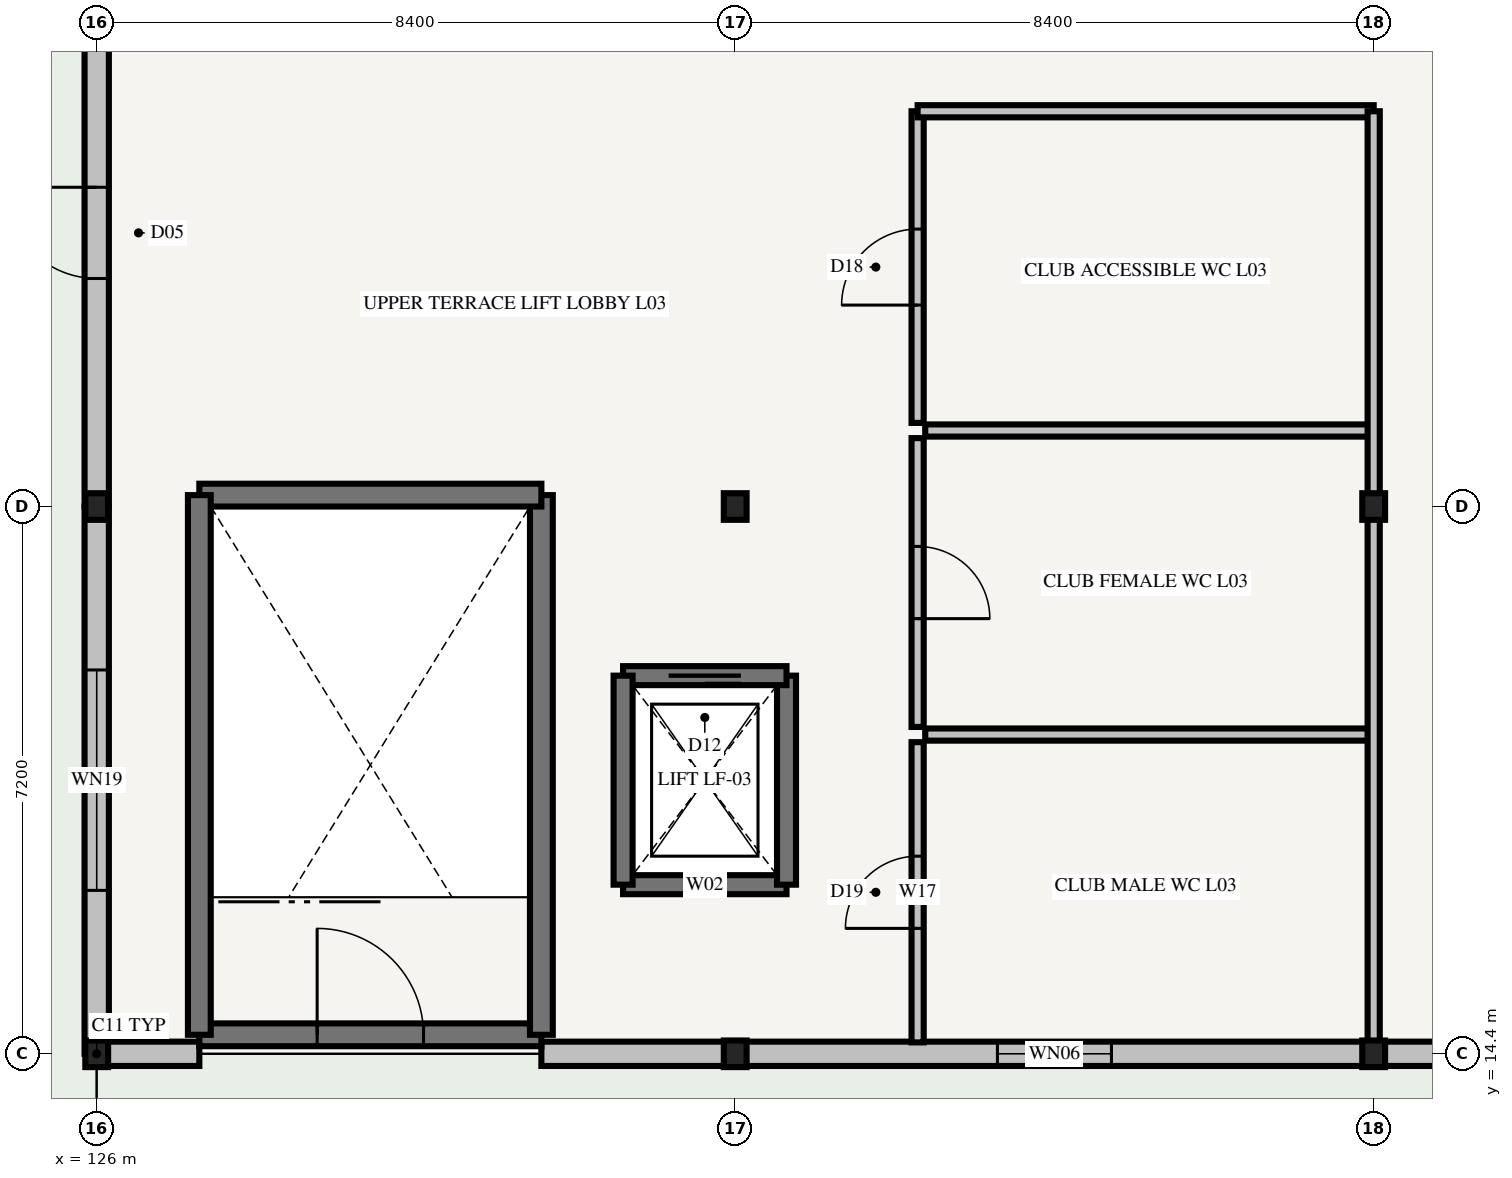
"""IFC4 building model, lengths in metres.
Left out: names, types, materials, properties, quantities, classifications, styles, units other than length and angle.
Written with IfcOpenShell. Run it as: python <this file> out.ifc"""

import sys

from ifc_helpers import new_model, si_unit, direction, frame, frame_2d, origin, origin_2d, place, context, subcontext, project, spatial, rectangle, i_section, extrude, element, fill, save


model = new_model("IFC4")
c1 = context("Model", 3, precision=1e-05, world=origin(), true_north=direction((0.0, 1.0)))
c2 = subcontext(c1, "Body", "Model", "MODEL_VIEW")
j1 = project(units=[si_unit("LENGTHUNIT", "METRE"), si_unit("PLANEANGLEUNIT", "RADIAN")], contexts=[c1])
p1 = place(None, origin())
s1 = spatial("IfcSite", under=j1, at=p1, CompositionType="ELEMENT")
p2 = place(p1, origin())
s2 = spatial("IfcBuilding", under=s1, at=p2, CompositionType="ELEMENT")
p3 = place(p2, frame((0.0, 0.0, 12.9)))
s3 = spatial("IfcBuildingStorey", under=s2, at=p3, CompositionType="ELEMENT", Elevation=12.9)
for number, where, z_axis, x_axis in (
    (1, (126.0, 14.4, 0.0), (0.0, 0.0, 1.0), (1.0, 0.0, 0.0)),
    (2, (126.0, 21.6, 0.0), (0.0, 0.0, 1.0), (1.0, 0.0, 0.0)),
    (3, (134.4, 14.4, 0.0), (0.0, 0.0, 1.0), (1.0, 0.0, 0.0)),
    (4, (134.4, 21.6, 0.0), (0.0, 0.0, 1.0), (1.0, 0.0, 0.0)),
    (5, (142.8, 14.4, 0.0), (0.0, 0.0, 1.0), (1.0, 0.0, 0.0)),
    (6, (142.8, 21.6, 0.0), (0.0, 0.0, 1.0), (1.0, 0.0, 0.0)),
):
    element("IfcColumn", number, at=place(p3, frame(where, z_axis=z_axis, x_axis=x_axis)), inside=s3, PredefinedType="COLUMN", context=c2, shape_type="SweptSolid", body=[
        extrude(i_section(OverallWidth=0.3, OverallDepth=0.35, WebThickness=0.01, FlangeThickness=0.018, FilletRadius=0.027, at=origin_2d()), origin(), (0.0, 0.0, 1.0), 4.2),
    ])
p4 = place(p3, frame((126.0, 28.8, 0.0), z_axis=(0.0, 0.0, 1.0), x_axis=(0.0, -1.0, 0.0)))
e7 = element("IfcWall", 7, at=p4, inside=s3, PredefinedType="STANDARD", context=c2, shape_type="SweptSolid", body=[
    extrude(rectangle(XDim=7.2, YDim=0.32, at=frame_2d((3.6, 0.0))), origin(), (0.0, 0.0, 1.0), 3.345),
])
p5 = place(p4, frame((3.0, 0.0, 0.0)))
e8 = element("IfcOpeningElement", 8, at=p5, cuts=e7, PredefinedType="OPENING", context=c2, shape_type="SweptSolid", body=[
    extrude(rectangle(XDim=1.2, YDim=2.25, at=frame_2d((0.6, 1.125))), frame((0.0, 0.185, 0.0), z_axis=(0.0, -1.0, 0.0), x_axis=(1.0, 0.0, 0.0)), (0.0, 0.0, 1.0), 0.37),
])
p6 = place(p3, frame((126.0, 21.6, 0.0), z_axis=(0.0, 0.0, 1.0), x_axis=(0.0, -1.0, 0.0)))
e9 = element("IfcWall", 9, at=p6, inside=s3, PredefinedType="STANDARD", context=c2, shape_type="SweptSolid", body=[
    extrude(rectangle(XDim=7.2, YDim=0.32, at=frame_2d((3.6, 0.0))), origin(), (0.0, 0.0, 1.0), 3.445),
])
p7 = place(p6, frame((2.15, 0.0, 0.85)))
e10 = element("IfcOpeningElement", 10, at=p7, cuts=e9, PredefinedType="OPENING", context=c2, shape_type="SweptSolid", body=[
    extrude(rectangle(XDim=2.9, YDim=1.9, at=frame_2d((1.45, 0.95))), frame((0.0, 0.185, 0.0), z_axis=(0.0, -1.0, 0.0), x_axis=(1.0, 0.0, 0.0)), (0.0, 0.0, 1.0), 0.37),
])
p8 = place(p3, frame((126.0, 14.4, 0.0), z_axis=(0.0, 0.0, 1.0), x_axis=(1.0, 0.0, 0.0)))
e11 = element("IfcWall", 11, at=p8, inside=s3, PredefinedType="STANDARD", context=c2, shape_type="SweptSolid", body=[
    extrude(rectangle(XDim=1.35, YDim=0.32, at=frame_2d((0.675, 0.0))), origin(), (0.0, 0.0, 1.0), 3.445),
])
p9 = place(p3, frame((131.85, 14.4, 0.0), z_axis=(0.0, 0.0, 1.0), x_axis=(1.0, 0.0, 0.0)))
e12 = element("IfcWall", 12, at=p9, inside=s3, PredefinedType="STANDARD", context=c2, shape_type="SweptSolid", body=[
    extrude(rectangle(XDim=2.55, YDim=0.32, at=frame_2d((1.275, 0.0))), origin(), (0.0, 0.0, 1.0), 3.495),
])
p10 = place(p3, frame((134.4, 14.4, 0.0), z_axis=(0.0, 0.0, 1.0), x_axis=(1.0, 0.0, 0.0)))
e13 = element("IfcWall", 13, at=p10, inside=s3, PredefinedType="STANDARD", context=c2, shape_type="SweptSolid", body=[
    extrude(rectangle(XDim=8.4, YDim=0.32, at=frame_2d((4.2, 0.0))), origin(), (0.0, 0.0, 1.0), 3.495),
])
p11 = place(p10, frame((3.45, 0.0, 0.85)))
e14 = element("IfcOpeningElement", 14, at=p11, cuts=e13, PredefinedType="OPENING", context=c2, shape_type="SweptSolid", body=[
    extrude(rectangle(XDim=1.5, YDim=1.8, at=frame_2d((0.75, 0.9))), frame((0.0, 0.185, 0.0), z_axis=(0.0, -1.0, 0.0), x_axis=(1.0, 0.0, 0.0)), (0.0, 0.0, 1.0), 0.37),
])
p12 = place(p3, frame((142.8, 14.4, 0.0), z_axis=(0.0, 0.0, 1.0), x_axis=(1.0, 0.0, 0.0)))
e15 = element("IfcWall", 15, at=p12, inside=s3, PredefinedType="STANDARD", context=c2, shape_type="SweptSolid", body=[
    extrude(rectangle(XDim=8.4, YDim=0.32, at=frame_2d((4.2, 0.0))), origin(), (0.0, 0.0, 1.0), 3.445),
])
p13 = place(p12, frame((3.36, 0.0, 0.0)))
e16 = element("IfcOpeningElement", 16, at=p13, cuts=e15, PredefinedType="OPENING", context=c2, shape_type="SweptSolid", body=[
    extrude(rectangle(XDim=1.68, YDim=2.3, at=frame_2d((0.84, 1.15))), frame((0.0, 0.185, 0.0), z_axis=(0.0, -1.0, 0.0), x_axis=(1.0, 0.0, 0.0)), (0.0, 0.0, 1.0), 0.37),
])
p14 = place(p3, frame((127.35, 14.65, 0.0), z_axis=(0.0, 0.0, 1.0), x_axis=(1.0, 0.0, 0.0)))
e17 = element("IfcWall", 17, at=p14, inside=s3, PredefinedType="SHEAR", context=c2, shape_type="SweptSolid", body=[
    extrude(rectangle(XDim=4.5, YDim=0.3, at=frame_2d((2.25, 0.0))), origin(), (0.0, 0.0, 1.0), 4.56),
])
p15 = place(p14, frame((1.55, 0.0, 0.0)))
e18 = element("IfcOpeningElement", 18, at=p15, cuts=e17, PredefinedType="OPENING", context=c2, shape_type="SweptSolid", body=[
    extrude(rectangle(XDim=1.4, YDim=2.2, at=frame_2d((0.7, 1.1))), frame((0.0, 0.175, 0.0), z_axis=(0.0, -1.0, 0.0), x_axis=(1.0, 0.0, 0.0)), (0.0, 0.0, 1.0), 0.35),
])
p16 = place(p3, frame((131.85, 14.65, 0.0), z_axis=(0.0, 0.0, 1.0), x_axis=(0.0, 1.0, 0.0)))
e19 = element("IfcWall", 19, at=p16, inside=s3, PredefinedType="SHEAR", context=c2, shape_type="SweptSolid", body=[
    extrude(rectangle(XDim=7.1, YDim=0.3, at=frame_2d((3.55, 0.0))), origin(), (0.0, 0.0, 1.0), 4.56),
])
p17 = place(p3, frame((131.85, 21.75, 0.0), z_axis=(0.0, 0.0, 1.0), x_axis=(-1.0, 0.0, 0.0)))
e20 = element("IfcWall", 20, at=p17, inside=s3, PredefinedType="SHEAR", context=c2, shape_type="SweptSolid", body=[
    extrude(rectangle(XDim=4.5, YDim=0.3, at=frame_2d((2.25, 0.0))), origin(), (0.0, 0.0, 1.0), 4.56),
])
p18 = place(p3, frame((127.35, 21.75, 0.0), z_axis=(0.0, 0.0, 1.0), x_axis=(0.0, -1.0, 0.0)))
e21 = element("IfcWall", 21, at=p18, inside=s3, PredefinedType="SHEAR", context=c2, shape_type="SweptSolid", body=[
    extrude(rectangle(XDim=7.1, YDim=0.3, at=frame_2d((3.55, 0.0))), origin(), (0.0, 0.0, 1.0), 4.56),
])
p19 = place(p3, frame((132.925, 16.625, 0.0), z_axis=(0.0, 0.0, 1.0), x_axis=(1.0, 0.0, 0.0)))
e22 = element("IfcWall", 22, at=p19, inside=s3, PredefinedType="SHEAR", context=c2, shape_type="SweptSolid", body=[
    extrude(rectangle(XDim=2.15, YDim=0.25, at=frame_2d((1.075, 0.0))), origin(), (0.0, 0.0, 1.0), 5.1),
])
p20 = place(p3, frame((135.075, 16.625, 0.0), z_axis=(0.0, 0.0, 1.0), x_axis=(0.0, 1.0, 0.0)))
e23 = element("IfcWall", 23, at=p20, inside=s3, PredefinedType="SHEAR", context=c2, shape_type="SweptSolid", body=[
    extrude(rectangle(XDim=2.75, YDim=0.25, at=frame_2d((1.375, 0.0))), origin(), (0.0, 0.0, 1.0), 5.1),
])
p21 = place(p3, frame((135.075, 19.375, 0.0), z_axis=(0.0, 0.0, 1.0), x_axis=(-1.0, 0.0, 0.0)))
e24 = element("IfcWall", 24, at=p21, inside=s3, PredefinedType="SHEAR", context=c2, shape_type="SweptSolid", body=[
    extrude(rectangle(XDim=2.15, YDim=0.25, at=frame_2d((1.075, 0.0))), origin(), (0.0, 0.0, 1.0), 5.1),
])
p22 = place(p21, frame((0.6, 0.0, 0.0)))
e25 = element("IfcOpeningElement", 25, at=p22, cuts=e24, PredefinedType="OPENING", context=c2, shape_type="SweptSolid", body=[
    extrude(rectangle(XDim=0.95, YDim=2.1, at=frame_2d((0.475, 1.05))), frame((0.0, 0.15, 0.0), z_axis=(0.0, -1.0, 0.0), x_axis=(1.0, 0.0, 0.0)), (0.0, 0.0, 1.0), 0.3),
])
p23 = place(p3, frame((132.925, 19.375, 0.0), z_axis=(0.0, 0.0, 1.0), x_axis=(0.0, -1.0, 0.0)))
e26 = element("IfcWall", 26, at=p23, inside=s3, PredefinedType="SHEAR", context=c2, shape_type="SweptSolid", body=[
    extrude(rectangle(XDim=2.75, YDim=0.25, at=frame_2d((1.375, 0.0))), origin(), (0.0, 0.0, 1.0), 5.1),
])
p24 = place(p3, frame((136.8, 14.55, 0.0), z_axis=(0.0, 0.0, 1.0), x_axis=(0.0, 1.0, 0.0)))
e27 = element("IfcWall", 27, at=p24, inside=s3, PredefinedType="PARTITIONING", context=c2, shape_type="SweptSolid", body=[
    extrude(rectangle(XDim=3.95, YDim=0.16, at=frame_2d((1.975, 0.0))), origin(), (0.0, 0.0, 1.0), 3.32),
])
p25 = place(p24, frame((1.5, 0.0, 0.0)))
e28 = element("IfcOpeningElement", 28, at=p25, cuts=e27, PredefinedType="OPENING", context=c2, shape_type="SweptSolid", body=[
    extrude(rectangle(XDim=0.95, YDim=2.15, at=frame_2d((0.475, 1.075))), frame((0.0, 0.105, 0.0), z_axis=(0.0, -1.0, 0.0), x_axis=(1.0, 0.0, 0.0)), (0.0, 0.0, 1.0), 0.21),
])
p26 = place(p3, frame((136.8, 18.7, 0.0), z_axis=(0.0, 0.0, 1.0), x_axis=(0.0, 1.0, 0.0)))
e29 = element("IfcWall", 29, at=p26, inside=s3, PredefinedType="PARTITIONING", context=c2, shape_type="SweptSolid", body=[
    extrude(rectangle(XDim=3.8, YDim=0.16, at=frame_2d((1.9, 0.0))), origin(), (0.0, 0.0, 1.0), 3.32),
])
p27 = place(p26, frame((1.425, 0.0, 0.0)))
e30 = element("IfcOpeningElement", 30, at=p27, cuts=e29, PredefinedType="OPENING", context=c2, shape_type="SweptSolid", body=[
    extrude(rectangle(XDim=0.95, YDim=2.15, at=frame_2d((0.475, 1.075))), frame((0.0, 0.105, 0.0), z_axis=(0.0, -1.0, 0.0), x_axis=(1.0, 0.0, 0.0)), (0.0, 0.0, 1.0), 0.21),
])
p28 = place(p3, frame((136.8, 22.7, 0.0), z_axis=(0.0, 0.0, 1.0), x_axis=(0.0, 1.0, 0.0)))
e31 = element("IfcWall", 31, at=p28, inside=s3, PredefinedType="PARTITIONING", context=c2, shape_type="SweptSolid", body=[
    extrude(rectangle(XDim=4.1, YDim=0.16, at=frame_2d((2.05, 0.0))), origin(), (0.0, 0.0, 1.0), 3.32),
])
p29 = place(p28, frame((1.55, 0.0, 0.0)))
e32 = element("IfcOpeningElement", 32, at=p29, cuts=e31, PredefinedType="OPENING", context=c2, shape_type="SweptSolid", body=[
    extrude(rectangle(XDim=1.0, YDim=2.15, at=frame_2d((0.5, 1.075))), frame((0.0, 0.105, 0.0), z_axis=(0.0, -1.0, 0.0), x_axis=(1.0, 0.0, 0.0)), (0.0, 0.0, 1.0), 0.21),
])
for number, where, z_axis, x_axis in (
    (33, (136.9, 18.6, 0.0), (0.0, 0.0, 1.0), (1.0, 0.0, 0.0)),
    (34, (136.9, 22.6, 0.0), (0.0, 0.0, 1.0), (1.0, 0.0, 0.0)),
):
    element("IfcWall", number, at=place(p3, frame(where, z_axis=z_axis, x_axis=x_axis)), inside=s3, PredefinedType="PARTITIONING", context=c2, shape_type="SweptSolid", body=[
        extrude(rectangle(XDim=5.9, YDim=0.16, at=frame_2d((2.95, 0.0))), origin(), (0.0, 0.0, 1.0), 3.32),
    ])
p30 = place(p3, frame((136.8, 26.8, 0.0), z_axis=(0.0, 0.0, 1.0), x_axis=(1.0, 0.0, 0.0)))
e35 = element("IfcWall", 35, at=p30, inside=s3, PredefinedType="PARTITIONING", context=c2, shape_type="SweptSolid", body=[
    extrude(rectangle(XDim=6.0, YDim=0.16, at=frame_2d((3.0, 0.0))), origin(), (0.0, 0.0, 1.0), 3.32),
])
p31 = place(p3, frame((142.8, 14.55, 0.0), z_axis=(0.0, 0.0, 1.0), x_axis=(0.0, 1.0, 0.0)))
e36 = element("IfcWall", 36, at=p31, inside=s3, PredefinedType="PARTITIONING", context=c2, shape_type="SweptSolid", body=[
    extrude(rectangle(XDim=12.25, YDim=0.16, at=frame_2d((6.125, 0.0))), origin(), (0.0, 0.0, 1.0), 3.32),
])
p32 = place(p5, frame((1.2, 0.0, 0.0), z_axis=(0.0, 0.0, 1.0), x_axis=(-1.0, 0.0, 0.0)))
e37 = element("IfcDoor", 37, at=p32, inside=s3, OperationType="SINGLE_SWING_RIGHT", PredefinedType="DOOR", context=c2, shape_type="SweptSolid", body=[
    extrude(rectangle(XDim=1.2, YDim=2.25, at=frame_2d((0.6, 1.125))), frame((0.0, 0.025, 0.0), z_axis=(0.0, -1.0, 0.0), x_axis=(1.0, 0.0, 0.0)), (0.0, 0.0, 1.0), 0.05),
])
fill(e8, e37)
p33 = place(p7, origin())
e38 = element("IfcWindow", 38, at=p33, inside=s3, PartitioningType="SINGLE_PANEL", PredefinedType="WINDOW", context=c2, shape_type="SweptSolid", body=[
    extrude(rectangle(XDim=2.9, YDim=1.9, at=frame_2d((1.45, 0.95))), frame((0.0, 0.03, 0.0), z_axis=(0.0, -1.0, 0.0), x_axis=(1.0, 0.0, 0.0)), (0.0, 0.0, 1.0), 0.06),
])
fill(e10, e38)
p34 = place(p11, origin())
e39 = element("IfcWindow", 39, at=p34, inside=s3, PartitioningType="SINGLE_PANEL", PredefinedType="WINDOW", context=c2, shape_type="SweptSolid", body=[
    extrude(rectangle(XDim=1.5, YDim=1.8, at=frame_2d((0.75, 0.9))), frame((0.0, 0.03, 0.0), z_axis=(0.0, -1.0, 0.0), x_axis=(1.0, 0.0, 0.0)), (0.0, 0.0, 1.0), 0.06),
])
fill(e14, e39)
p35 = place(p15, frame((1.4, 0.0, 0.0), z_axis=(0.0, 0.0, 1.0), x_axis=(-1.0, 0.0, 0.0)))
e40 = element("IfcDoor", 40, at=p35, inside=s3, OperationType="SINGLE_SWING_LEFT", PredefinedType="DOOR", context=c2, shape_type="SweptSolid", body=[
    extrude(rectangle(XDim=1.4, YDim=2.2, at=frame_2d((0.7, 1.1))), frame((0.0, 0.025, 0.0), z_axis=(0.0, -1.0, 0.0), x_axis=(1.0, 0.0, 0.0)), (0.0, 0.0, 1.0), 0.05),
])
fill(e18, e40)
p36 = place(p22, origin())
e41 = element("IfcDoor", 41, at=p36, inside=s3, OperationType="SLIDING_TO_LEFT", PredefinedType="DOOR", context=c2, shape_type="SweptSolid", body=[
    extrude(rectangle(XDim=0.95, YDim=2.1, at=frame_2d((0.475, 1.05))), frame((0.0, 0.025, 0.0), z_axis=(0.0, -1.0, 0.0), x_axis=(1.0, 0.0, 0.0)), (0.0, 0.0, 1.0), 0.05),
])
fill(e25, e41)
p37 = place(p25, frame((0.95, 0.0, 0.0), z_axis=(0.0, 0.0, 1.0), x_axis=(-1.0, 0.0, 0.0)))
e42 = element("IfcDoor", 42, at=p37, inside=s3, OperationType="SINGLE_SWING_LEFT", PredefinedType="DOOR", context=c2, shape_type="SweptSolid", body=[
    extrude(rectangle(XDim=0.95, YDim=2.15, at=frame_2d((0.475, 1.075))), frame((0.0, 0.025, 0.0), z_axis=(0.0, -1.0, 0.0), x_axis=(1.0, 0.0, 0.0)), (0.0, 0.0, 1.0), 0.05),
])
fill(e28, e42)
p38 = place(p27, origin())
e43 = element("IfcDoor", 43, at=p38, inside=s3, OperationType="SINGLE_SWING_RIGHT", PredefinedType="DOOR", context=c2, shape_type="SweptSolid", body=[
    extrude(rectangle(XDim=0.95, YDim=2.15, at=frame_2d((0.475, 1.075))), frame((0.0, 0.025, 0.0), z_axis=(0.0, -1.0, 0.0), x_axis=(1.0, 0.0, 0.0)), (0.0, 0.0, 1.0), 0.05),
])
fill(e30, e43)
p39 = place(p29, origin())
e44 = element("IfcDoor", 44, at=p39, inside=s3, OperationType="SINGLE_SWING_LEFT", PredefinedType="DOOR", context=c2, shape_type="SweptSolid", body=[
    extrude(rectangle(XDim=1.0, YDim=2.15, at=frame_2d((0.5, 1.075))), frame((0.0, 0.025, 0.0), z_axis=(0.0, -1.0, 0.0), x_axis=(1.0, 0.0, 0.0)), (0.0, 0.0, 1.0), 0.05),
])
fill(e32, e44)
save(model, sys.argv[1])
